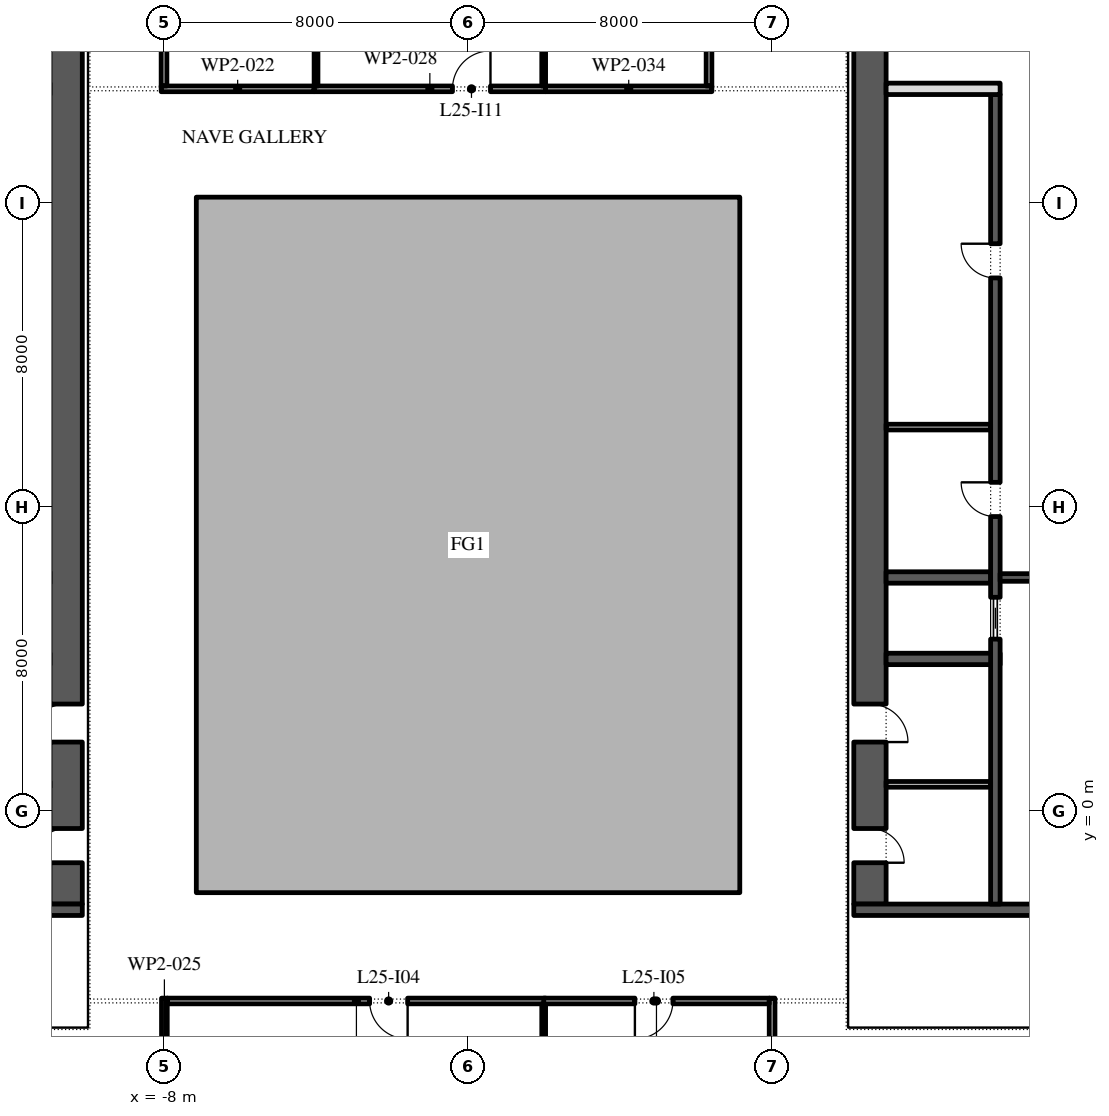
"""IFC4 building model, lengths in metres.
Left out: names, types, materials, properties, quantities, classifications, styles, units other than length and angle.
Written with IfcOpenShell. Run it as: python <this file> out.ifc"""

import sys

from ifc_helpers import new_model, si_unit, direction, frame, frame_2d, origin, place, context, subcontext, project, spatial, polyline, rectangle, outline, extrude, element, fill, save


model = new_model("IFC4")
c1 = context("Model", 3, precision=1e-05, world=origin(), true_north=direction((0.0, 1.0)))
c2 = subcontext(c1, "Body", "Model", "MODEL_VIEW")
j1 = project(units=[si_unit("LENGTHUNIT", "METRE"), si_unit("PLANEANGLEUNIT", "RADIAN")], contexts=[c1])
p1 = place(None, origin())
s1 = spatial("IfcSite", under=j1, at=p1, CompositionType="ELEMENT")
p2 = place(p1, origin())
s2 = spatial("IfcBuilding", under=s1, at=p2, CompositionType="ELEMENT")
p3 = place(p2, frame((0.0, 0.0, 118.2)))
s3 = spatial("IfcBuildingStorey", under=s2, at=p3, CompositionType="ELEMENT", Elevation=118.2)
p4 = place(p3, origin())
e1 = element("IfcWall", 1, at=p4, inside=s3, PredefinedType="STANDARD", context=c2, shape_type="SweptSolid", body=[
    extrude(outline(polyline([(-7.15, -2.15), (7.15, -2.15), (7.15, 16.15), (-7.15, 16.15), (-7.15, -2.15)]), holes=[polyline([(-7.0, -2.0), (-7.0, 16.0), (7.0, 16.0), (7.0, -2.0), (-7.0, -2.0)])]), origin(), (0.0, 0.0, 1.0), 4.0),
])
p5 = place(p3, frame((-10.575, -2.45, 0.0), z_axis=(0.0, 0.0, 1.0), x_axis=(0.0, 1.0, 0.0)))
e2 = element("IfcWall", 2, at=p5, inside=s3, PredefinedType="SHEAR", context=c2, shape_type="SweptSolid", body=[
    extrude(rectangle(XDim=27.9, YDim=0.85, at=frame_2d((13.95, 0.0))), origin(), (0.0, 0.0, 1.0), 4.0),
])
p6 = place(p5, frame((23.65, 0.0, 0.0)))
e3 = element("IfcOpeningElement", 3, at=p6, cuts=e2, PredefinedType="OPENING", context=c2, shape_type="SweptSolid", body=[
    extrude(rectangle(XDim=2.4, YDim=2.1, at=frame_2d((1.2, 1.05))), frame((0.0, 0.435, 0.0), z_axis=(0.0, -1.0, 0.0), x_axis=(1.0, 0.0, 0.0)), (0.0, 0.0, 1.0), 0.87),
])
p7 = place(p5, frame((1.087, 0.0, 0.0)))
e4 = element("IfcOpeningElement", 4, at=p7, cuts=e2, PredefinedType="OPENING", context=c2, shape_type="SweptSolid", body=[
    extrude(rectangle(XDim=0.9, YDim=2.1, at=frame_2d((0.45, 1.05))), frame((0.0, 0.435, 0.0), z_axis=(0.0, -1.0, 0.0), x_axis=(1.0, 0.0, 0.0)), (0.0, 0.0, 1.0), 0.87),
])
p8 = place(p5, frame((4.262, 0.0, 0.0)))
e5 = element("IfcOpeningElement", 5, at=p8, cuts=e2, PredefinedType="OPENING", context=c2, shape_type="SweptSolid", body=[
    extrude(rectangle(XDim=1.0, YDim=2.1, at=frame_2d((0.5, 1.05))), frame((0.0, 0.435, 0.0), z_axis=(0.0, -1.0, 0.0), x_axis=(1.0, 0.0, 0.0)), (0.0, 0.0, 1.0), 0.87),
])
p9 = place(p3, frame((-21.85, -2.6, 0.0), z_axis=(0.0, 0.0, 1.0), x_axis=(1.0, 0.0, 0.0)))
e6 = element("IfcWall", 6, at=p9, inside=s3, PredefinedType="SHEAR", context=c2, shape_type="SweptSolid", body=[
    extrude(rectangle(XDim=11.7, YDim=0.3, at=frame_2d((5.85, 0.0))), origin(), (0.0, 0.0, 1.0), 4.0),
])
p10 = place(p3, frame((10.575, -2.45, 0.0), z_axis=(0.0, 0.0, 1.0), x_axis=(0.0, 1.0, 0.0)))
e7 = element("IfcWall", 7, at=p10, inside=s3, PredefinedType="SHEAR", context=c2, shape_type="SweptSolid", body=[
    extrude(rectangle(XDim=27.9, YDim=0.85, at=frame_2d((13.95, 0.0))), origin(), (0.0, 0.0, 1.0), 4.0),
])
p11 = place(p10, frame((23.65, 0.0, 0.0)))
e8 = element("IfcOpeningElement", 8, at=p11, cuts=e7, PredefinedType="OPENING", context=c2, shape_type="SweptSolid", body=[
    extrude(rectangle(XDim=2.4, YDim=2.1, at=frame_2d((1.2, 1.05))), frame((0.0, 0.435, 0.0), z_axis=(0.0, -1.0, 0.0), x_axis=(1.0, 0.0, 0.0)), (0.0, 0.0, 1.0), 0.87),
])
p12 = place(p10, frame((1.087, 0.0, 0.0)))
e9 = element("IfcOpeningElement", 9, at=p12, cuts=e7, PredefinedType="OPENING", context=c2, shape_type="SweptSolid", body=[
    extrude(rectangle(XDim=0.9, YDim=2.1, at=frame_2d((0.45, 1.05))), frame((0.0, 0.435, 0.0), z_axis=(0.0, -1.0, 0.0), x_axis=(1.0, 0.0, 0.0)), (0.0, 0.0, 1.0), 0.87),
])
p13 = place(p10, frame((4.262, 0.0, 0.0)))
e10 = element("IfcOpeningElement", 10, at=p13, cuts=e7, PredefinedType="OPENING", context=c2, shape_type="SweptSolid", body=[
    extrude(rectangle(XDim=1.0, YDim=2.1, at=frame_2d((0.5, 1.05))), frame((0.0, 0.435, 0.0), z_axis=(0.0, -1.0, 0.0), x_axis=(1.0, 0.0, 0.0)), (0.0, 0.0, 1.0), 0.87),
])
p14 = place(p3, frame((10.15, -2.6, 0.0), z_axis=(0.0, 0.0, 1.0), x_axis=(1.0, 0.0, 0.0)))
e11 = element("IfcWall", 11, at=p14, inside=s3, PredefinedType="SHEAR", context=c2, shape_type="SweptSolid", body=[
    extrude(rectangle(XDim=11.7, YDim=0.3, at=frame_2d((5.85, 0.0))), origin(), (0.0, 0.0, 1.0), 4.0),
])
p15 = place(p3, frame((11.0, 4.0, 0.0), z_axis=(0.0, 0.0, 1.0), x_axis=(1.0, 0.0, 0.0)))
e12 = element("IfcWall", 12, at=p15, inside=s3, PredefinedType="SHEAR", context=c2, shape_type="SweptSolid", body=[
    extrude(rectangle(XDim=3.0, YDim=0.3, at=frame_2d((1.5, 0.0))), origin(), (0.0, 0.0, 1.0), 4.0),
])
p16 = place(p3, frame((11.0, 6.143, 0.0), z_axis=(0.0, 0.0, 1.0), x_axis=(1.0, 0.0, 0.0)))
e13 = element("IfcWall", 13, at=p16, inside=s3, PredefinedType="SHEAR", context=c2, shape_type="SweptSolid", body=[
    extrude(rectangle(XDim=2.75, YDim=0.3, at=frame_2d((1.375, 0.0))), origin(), (0.0, 0.0, 1.0), 4.0),
])
p17 = place(p3, frame((13.875, -2.45, 0.0), z_axis=(0.0, 0.0, 1.0), x_axis=(0.0, 1.0, 0.0)))
e14 = element("IfcWall", 14, at=p17, inside=s3, PredefinedType="SHEAR", context=c2, shape_type="SweptSolid", body=[
    extrude(rectangle(XDim=21.3, YDim=0.25, at=frame_2d((10.65, 0.0))), origin(), (0.0, 0.0, 1.0), 4.0),
])
p18 = place(p17, frame((10.196, 0.0, 0.0)))
e15 = element("IfcOpeningElement", 15, at=p18, cuts=e14, PredefinedType="OPENING", context=c2, shape_type="SweptSolid", body=[
    extrude(rectangle(XDim=0.9, YDim=2.1, at=frame_2d((0.45, 1.05))), frame((0.0, 0.135, 0.0), z_axis=(0.0, -1.0, 0.0), x_axis=(1.0, 0.0, 0.0)), (0.0, 0.0, 1.0), 0.27),
])
p19 = place(p17, frame((16.475, 0.0, 0.0)))
e16 = element("IfcOpeningElement", 16, at=p19, cuts=e14, PredefinedType="OPENING", context=c2, shape_type="SweptSolid", body=[
    extrude(rectangle(XDim=0.9, YDim=2.1, at=frame_2d((0.45, 1.05))), frame((0.0, 0.135, 0.0), z_axis=(0.0, -1.0, 0.0), x_axis=(1.0, 0.0, 0.0)), (0.0, 0.0, 1.0), 0.27),
])
p20 = place(p17, frame((6.971, 0.0, 0.0)))
e17 = element("IfcOpeningElement", 17, at=p20, cuts=e14, PredefinedType="OPENING", context=c2, shape_type="SweptSolid", body=[
    extrude(rectangle(XDim=1.1, YDim=2.1, at=frame_2d((0.55, 1.05))), frame((0.0, 0.135, 0.0), z_axis=(0.0, -1.0, 0.0), x_axis=(1.0, 0.0, 0.0)), (0.0, 0.0, 1.0), 0.27),
])
p21 = place(p3, frame((11.0, 19.0, 0.0), z_axis=(0.0, 0.0, 1.0), x_axis=(1.0, 0.0, 0.0)))
e18 = element("IfcWall", 18, at=p21, inside=s3, PredefinedType="PARTITIONING", context=c2, shape_type="SweptSolid", body=[
    extrude(rectangle(XDim=3.0, YDim=0.3, at=frame_2d((1.5, 0.0))), origin(), (0.0, 0.0, 1.0), 4.0),
])
p22 = place(p3, frame((11.0, 10.1, 0.0), z_axis=(0.0, 0.0, 1.0), x_axis=(1.0, 0.0, 0.0)))
e19 = element("IfcWall", 19, at=p22, inside=s3, PredefinedType="PARTITIONING", context=c2, shape_type="SweptSolid", body=[
    extrude(rectangle(XDim=2.75, YDim=0.15, at=frame_2d((1.375, 0.0))), origin(), (0.0, 0.0, 1.0), 4.0),
])
p23 = place(p3, frame((14.0, 6.143, 0.0), z_axis=(0.0, 0.0, 1.0), x_axis=(1.0, 0.0, 0.0)))
e20 = element("IfcWall", 20, at=p23, inside=s3, PredefinedType="SHEAR", context=c2, shape_type="SweptSolid", body=[
    extrude(rectangle(XDim=4.0, YDim=0.2, at=frame_2d((2.0, 0.0))), origin(), (0.0, 0.0, 1.0), 4.0),
])
p24 = place(p23, frame((1.4, 0.0, 0.0)))
e21 = element("IfcOpeningElement", 21, at=p24, cuts=e20, PredefinedType="OPENING", context=c2, shape_type="SweptSolid", body=[
    extrude(rectangle(XDim=1.2, YDim=2.1, at=frame_2d((0.6, 1.05))), frame((0.0, 0.11, 0.0), z_axis=(0.0, -1.0, 0.0), x_axis=(1.0, 0.0, 0.0)), (0.0, 0.0, 1.0), 0.22),
])
p25 = place(p3, frame((11.0, 0.7, 0.0), z_axis=(0.0, 0.0, 1.0), x_axis=(1.0, 0.0, 0.0)))
e22 = element("IfcWall", 22, at=p25, inside=s3, PredefinedType="PARTITIONING", context=c2, shape_type="SweptSolid", body=[
    extrude(rectangle(XDim=2.75, YDim=0.15, at=frame_2d((1.375, 0.0))), origin(), (0.0, 0.0, 1.0), 4.0),
])
p26 = place(p3, frame((-8.075, 19.0, 0.0), z_axis=(0.0, 0.0, 1.0), x_axis=(1.0, 0.0, 0.0)))
e23 = element("IfcWall", 23, at=p26, inside=s3, PredefinedType="PARTITIONING", context=c2, shape_type="SweptSolid", body=[
    extrude(rectangle(XDim=4.025, YDim=0.15, at=frame_2d((2.012, 0.0))), origin(), (0.0, 0.0, 1.0), 4.0),
])
p27 = place(p3, frame((-8.0, 27.325, 0.0), z_axis=(0.0, 0.0, 1.0), x_axis=(0.0, -1.0, 0.0)))
e24 = element("IfcWall", 24, at=p27, inside=s3, PredefinedType="PARTITIONING", context=c2, shape_type="SweptSolid", body=[
    extrude(rectangle(XDim=8.25, YDim=0.15, at=frame_2d((4.125, 0.0))), origin(), (0.0, 0.0, 1.0), 4.0),
])
p28 = place(p27, frame((2.675, 0.0, 0.0)))
e25 = element("IfcOpeningElement", 25, at=p28, cuts=e24, PredefinedType="OPENING", context=c2, shape_type="SweptSolid", body=[
    extrude(rectangle(XDim=1.0, YDim=2.1, at=frame_2d((0.5, 1.05))), frame((0.0, 0.085, 0.0), z_axis=(0.0, -1.0, 0.0), x_axis=(1.0, 0.0, 0.0)), (0.0, 0.0, 1.0), 0.17),
])
p29 = place(p3, frame((-7.99, -4.925, 0.0), z_axis=(0.0, 0.0, 1.0), x_axis=(0.0, -1.0, 0.0)))
e26 = element("IfcWall", 26, at=p29, inside=s3, PredefinedType="PARTITIONING", context=c2, shape_type="SweptSolid", body=[
    extrude(rectangle(XDim=2.69, YDim=0.15, at=frame_2d((1.345, 0.0))), origin(), (0.0, 0.0, 1.0), 4.0),
])
p30 = place(p3, frame((-4.05, 19.0, 0.0), z_axis=(0.0, 0.0, 1.0), x_axis=(1.0, 0.0, 0.0)))
e27 = element("IfcWall", 27, at=p30, inside=s3, PredefinedType="PARTITIONING", context=c2, shape_type="SweptSolid", body=[
    extrude(rectangle(XDim=6.09, YDim=0.15, at=frame_2d((3.045, 0.0))), origin(), (0.0, 0.0, 1.0), 4.0),
])
p31 = place(p30, frame((3.64, 0.0, 0.0)))
e28 = element("IfcOpeningElement", 28, at=p31, cuts=e27, PredefinedType="OPENING", context=c2, shape_type="SweptSolid", body=[
    extrude(rectangle(XDim=1.0, YDim=2.1, at=frame_2d((0.5, 1.05))), frame((0.0, 0.085, 0.0), z_axis=(0.0, -1.0, 0.0), x_axis=(1.0, 0.0, 0.0)), (0.0, 0.0, 1.0), 0.17),
])
p32 = place(p3, frame((-4.0, 33.95, 0.0), z_axis=(0.0, 0.0, 1.0), x_axis=(0.0, -1.0, 0.0)))
e29 = element("IfcWall", 29, at=p32, inside=s3, PredefinedType="PARTITIONING", context=c2, shape_type="SweptSolid", body=[
    extrude(rectangle(XDim=14.875, YDim=0.1, at=frame_2d((7.438, 0.0))), origin(), (0.0, 0.0, 1.0), 4.0),
])
p33 = place(p3, frame((2.04, -5.0, 0.0), z_axis=(0.0, 0.0, 1.0), x_axis=(-1.0, 0.0, 0.0)))
e30 = element("IfcWall", 30, at=p33, inside=s3, PredefinedType="PARTITIONING", context=c2, shape_type="SweptSolid", body=[
    extrude(rectangle(XDim=9.955, YDim=0.15, at=frame_2d((4.978, 0.0))), origin(), (0.0, 0.0, 1.0), 4.0),
])
p34 = place(p33, frame((3.63, 0.0, 0.0)))
e31 = element("IfcOpeningElement", 31, at=p34, cuts=e30, PredefinedType="OPENING", context=c2, shape_type="SweptSolid", body=[
    extrude(rectangle(XDim=1.0, YDim=2.1, at=frame_2d((0.5, 1.05))), frame((0.0, 0.085, 0.0), z_axis=(0.0, -1.0, 0.0), x_axis=(1.0, 0.0, 0.0)), (0.0, 0.0, 1.0), 0.17),
])
p35 = place(p3, frame((1.99, -5.075, 0.0), z_axis=(0.0, 0.0, 1.0), x_axis=(0.0, -1.0, 0.0)))
e32 = element("IfcWall", 32, at=p35, inside=s3, PredefinedType="PARTITIONING", context=c2, shape_type="SweptSolid", body=[
    extrude(rectangle(XDim=12.215, YDim=0.1, at=frame_2d((6.107, 0.0))), origin(), (0.0, 0.0, 1.0), 4.0),
])
p36 = place(p3, frame((2.04, 19.0, 0.0), z_axis=(0.0, 0.0, 1.0), x_axis=(1.0, 0.0, 0.0)))
e33 = element("IfcWall", 33, at=p36, inside=s3, PredefinedType="PARTITIONING", context=c2, shape_type="SweptSolid", body=[
    extrude(rectangle(XDim=4.375, YDim=0.15, at=frame_2d((2.188, 0.0))), origin(), (0.0, 0.0, 1.0), 4.0),
])
p37 = place(p3, frame((1.99, 33.95, 0.0), z_axis=(0.0, 0.0, 1.0), x_axis=(0.0, -1.0, 0.0)))
e34 = element("IfcWall", 34, at=p37, inside=s3, PredefinedType="PARTITIONING", context=c2, shape_type="SweptSolid", body=[
    extrude(rectangle(XDim=14.875, YDim=0.1, at=frame_2d((7.438, 0.0))), origin(), (0.0, 0.0, 1.0), 4.0),
])
p38 = place(p3, frame((6.34, 19.075, 0.0), z_axis=(0.0, 0.0, 1.0), x_axis=(0.0, 1.0, 0.0)))
e35 = element("IfcWall", 35, at=p38, inside=s3, PredefinedType="PARTITIONING", context=c2, shape_type="SweptSolid", body=[
    extrude(rectangle(XDim=8.39, YDim=0.15, at=frame_2d((4.195, 0.0))), origin(), (0.0, 0.0, 1.0), 4.0),
])
p39 = place(p38, frame((3.665, 0.0, 0.0)))
e36 = element("IfcOpeningElement", 36, at=p39, cuts=e35, PredefinedType="OPENING", context=c2, shape_type="SweptSolid", body=[
    extrude(rectangle(XDim=1.0, YDim=2.1, at=frame_2d((0.5, 1.05))), frame((0.0, 0.085, 0.0), z_axis=(0.0, -1.0, 0.0), x_axis=(1.0, 0.0, 0.0)), (0.0, 0.0, 1.0), 0.17),
])
p40 = place(p3, frame((8.0, -7.775, 0.0), z_axis=(0.0, 0.0, 1.0), x_axis=(0.0, 1.0, 0.0)))
e37 = element("IfcWall", 37, at=p40, inside=s3, PredefinedType="PARTITIONING", context=c2, shape_type="SweptSolid", body=[
    extrude(rectangle(XDim=2.85, YDim=0.15, at=frame_2d((1.425, 0.0))), origin(), (0.0, 0.0, 1.0), 4.0),
])
p41 = place(p3, frame((7.925, -5.0, 0.0), z_axis=(0.0, 0.0, 1.0), x_axis=(-1.0, 0.0, 0.0)))
e38 = element("IfcWall", 38, at=p41, inside=s3, PredefinedType="PARTITIONING", context=c2, shape_type="SweptSolid", body=[
    extrude(rectangle(XDim=5.935, YDim=0.15, at=frame_2d((2.968, 0.0))), origin(), (0.0, 0.0, 1.0), 4.0),
])
p42 = place(p41, frame((2.535, 0.0, 0.0)))
e39 = element("IfcOpeningElement", 39, at=p42, cuts=e38, PredefinedType="OPENING", context=c2, shape_type="SweptSolid", body=[
    extrude(rectangle(XDim=1.0, YDim=2.1, at=frame_2d((0.5, 1.05))), frame((0.0, 0.085, 0.0), z_axis=(0.0, -1.0, 0.0), x_axis=(1.0, 0.0, 0.0)), (0.0, 0.0, 1.0), 0.17),
])
p43 = place(p7, origin())
e40 = element("IfcDoor", 40, at=p43, inside=s3, OperationType="SINGLE_SWING_RIGHT", PredefinedType="DOOR", context=c2, shape_type="SweptSolid", body=[
    extrude(rectangle(XDim=0.9, YDim=2.1, at=frame_2d((0.45, 1.05))), frame((0.0, 0.425, 0.0), z_axis=(0.0, -1.0, 0.0), x_axis=(1.0, 0.0, 0.0)), (0.0, 0.0, 1.0), 0.05),
])
fill(e4, e40)
p44 = place(p8, origin())
e41 = element("IfcDoor", 41, at=p44, inside=s3, OperationType="SINGLE_SWING_RIGHT", PredefinedType="DOOR", context=c2, shape_type="SweptSolid", body=[
    extrude(rectangle(XDim=1.0, YDim=2.1, at=frame_2d((0.5, 1.05))), frame((0.0, 0.425, 0.0), z_axis=(0.0, -1.0, 0.0), x_axis=(1.0, 0.0, 0.0)), (0.0, 0.0, 1.0), 0.05),
])
fill(e5, e41)
p45 = place(p18, origin())
e42 = element("IfcDoor", 42, at=p45, inside=s3, OperationType="SINGLE_SWING_LEFT", PredefinedType="DOOR", context=c2, shape_type="SweptSolid", body=[
    extrude(rectangle(XDim=0.9, YDim=2.1, at=frame_2d((0.45, 1.05))), frame((0.0, 0.125, 0.0), z_axis=(0.0, -1.0, 0.0), x_axis=(1.0, 0.0, 0.0)), (0.0, 0.0, 1.0), 0.05),
])
fill(e15, e42)
p46 = place(p19, origin())
e43 = element("IfcDoor", 43, at=p46, inside=s3, OperationType="SINGLE_SWING_LEFT", PredefinedType="DOOR", context=c2, shape_type="SweptSolid", body=[
    extrude(rectangle(XDim=0.9, YDim=2.1, at=frame_2d((0.45, 1.05))), frame((0.0, 0.125, 0.0), z_axis=(0.0, -1.0, 0.0), x_axis=(1.0, 0.0, 0.0)), (0.0, 0.0, 1.0), 0.05),
])
fill(e16, e43)
p47 = place(p20, origin())
e44 = element("IfcDoor", 44, at=p47, inside=s3, OperationType="SLIDING_TO_LEFT", PredefinedType="DOOR", context=c2, shape_type="SweptSolid", body=[
    extrude(rectangle(XDim=1.1, YDim=2.1, at=frame_2d((0.55, 1.05))), frame((0.0, 0.025, 0.0), z_axis=(0.0, -1.0, 0.0), x_axis=(1.0, 0.0, 0.0)), (0.0, 0.0, 1.0), 0.05),
])
fill(e17, e44)
p48 = place(p12, frame((0.9, -0.8, 0.0), z_axis=(0.0, 0.0, 1.0), x_axis=(-1.0, 0.0, 0.0)))
e45 = element("IfcDoor", 45, at=p48, inside=s3, OperationType="SINGLE_SWING_LEFT", PredefinedType="DOOR", context=c2, shape_type="SweptSolid", body=[
    extrude(rectangle(XDim=0.9, YDim=2.1, at=frame_2d((0.45, 1.05))), frame((0.0, -0.375, 0.0), z_axis=(0.0, -1.0, 0.0), x_axis=(1.0, 0.0, 0.0)), (0.0, 0.0, 1.0), 0.05),
])
fill(e9, e45)
p49 = place(p13, frame((1.0, -0.8, 0.0), z_axis=(0.0, 0.0, 1.0), x_axis=(-1.0, 0.0, 0.0)))
e46 = element("IfcDoor", 46, at=p49, inside=s3, OperationType="SINGLE_SWING_LEFT", PredefinedType="DOOR", context=c2, shape_type="SweptSolid", body=[
    extrude(rectangle(XDim=1.0, YDim=2.1, at=frame_2d((0.5, 1.05))), frame((0.0, -0.375, 0.0), z_axis=(0.0, -1.0, 0.0), x_axis=(1.0, 0.0, 0.0)), (0.0, 0.0, 1.0), 0.05),
])
fill(e10, e46)
p50 = place(p34, origin())
e47 = element("IfcDoor", 47, at=p50, inside=s3, OperationType="SINGLE_SWING_RIGHT", PredefinedType="DOOR", context=c2, shape_type="SweptSolid", body=[
    extrude(rectangle(XDim=1.0, YDim=2.1, at=frame_2d((0.5, 1.05))), frame((0.0, 0.025, 0.0), z_axis=(0.0, -1.0, 0.0), x_axis=(1.0, 0.0, 0.0)), (0.0, 0.0, 1.0), 0.05),
])
fill(e31, e47)
p51 = place(p42, origin())
e48 = element("IfcDoor", 48, at=p51, inside=s3, OperationType="SINGLE_SWING_LEFT", PredefinedType="DOOR", context=c2, shape_type="SweptSolid", body=[
    extrude(rectangle(XDim=1.0, YDim=2.1, at=frame_2d((0.5, 1.05))), frame((0.0, 0.025, 0.0), z_axis=(0.0, -1.0, 0.0), x_axis=(1.0, 0.0, 0.0)), (0.0, 0.0, 1.0), 0.05),
])
fill(e39, e48)
p52 = place(p31, origin())
e49 = element("IfcDoor", 49, at=p52, inside=s3, OperationType="SINGLE_SWING_LEFT", PredefinedType="DOOR", context=c2, shape_type="SweptSolid", body=[
    extrude(rectangle(XDim=1.0, YDim=2.1, at=frame_2d((0.5, 1.05))), frame((0.0, 0.025, 0.0), z_axis=(0.0, -1.0, 0.0), x_axis=(1.0, 0.0, 0.0)), (0.0, 0.0, 1.0), 0.05),
])
fill(e28, e49)
save(model, sys.argv[1])
